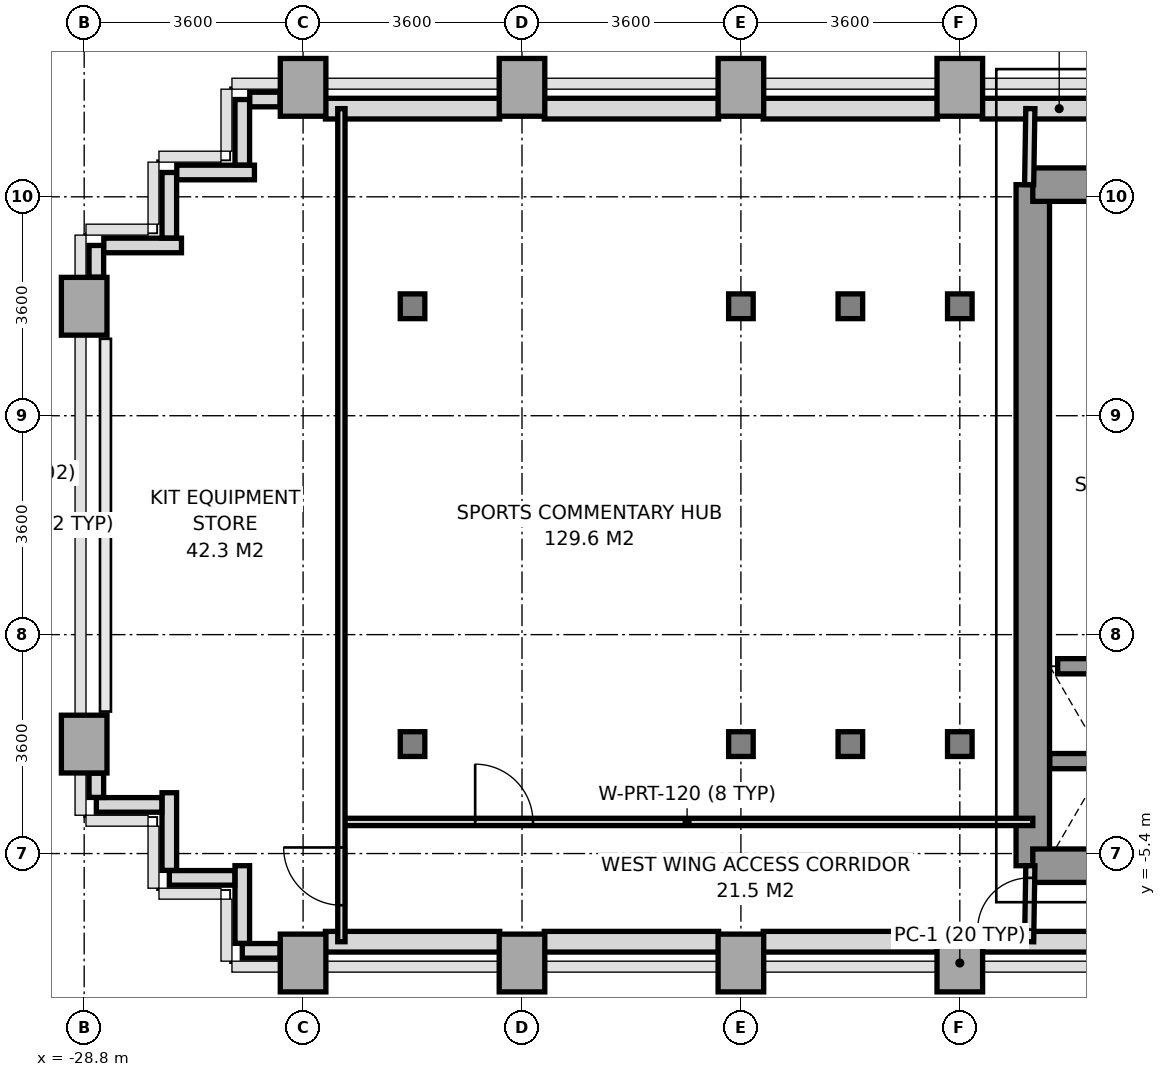
"""IFC4 building model, lengths in metres.
Left out: names, types, materials, properties, quantities, classifications, styles, units other than length and angle.
Written with IfcOpenShell. Run it as: python <this file> out.ifc"""

import sys

from ifc_helpers import new_model, si_unit, direction, frame, frame_2d, origin, origin_2d, place, context, subcontext, project, spatial, rectangle, i_section, extrude, source, transform, mapped, element, fill, save


model = new_model("IFC4")
c1 = context("Model", 3, precision=1e-05, world=origin(), true_north=direction((0.0, 1.0)))
c2 = subcontext(c1, "Body", "Model", "MODEL_VIEW")
j1 = project(units=[si_unit("LENGTHUNIT", "METRE"), si_unit("PLANEANGLEUNIT", "RADIAN")], contexts=[c1])
p1 = place(None, origin())
s1 = spatial("IfcSite", under=j1, at=p1, CompositionType="ELEMENT")
p2 = place(p1, origin())
s2 = spatial("IfcBuilding", under=s1, at=p2, CompositionType="ELEMENT")
p3 = place(p2, frame((0.0, 0.0, 74.8)))
s3 = spatial("IfcBuildingStorey", under=s2, at=p3, CompositionType="ELEMENT", Elevation=74.8)
m1 = source(origin(), c2, "Body", "SweptSolid", [
    extrude(rectangle(XDim=0.75, YDim=0.95, at=origin_2d()), origin(), (0.0, 0.0, 1.0), 3.2),
])
for number, where, z_axis, x_axis in (
    (1, (-28.8, -3.6, 0.0), (0.0, 0.0, 1.0), (1.0, 0.0, 0.0)),
    (2, (-28.8, 3.6, 0.0), (0.0, 0.0, 1.0), (1.0, 0.0, 0.0)),
    (3, (-25.2, -7.2, 0.0), (0.0, 0.0, 1.0), (1.0, 0.0, 0.0)),
    (4, (-25.2, 7.2, 0.0), (0.0, 0.0, 1.0), (1.0, 0.0, 0.0)),
):
    element("IfcColumn", number, at=place(p3, frame(where, z_axis=z_axis, x_axis=x_axis)), inside=s3, PredefinedType="COLUMN", context=c2, shape_type="MappedRepresentation", body=[
        mapped(m1, transform((0.0, 0.0, 0.0), x_axis=(1.0, 0.0, 0.0), y_axis=(0.0, 1.0, 0.0), z_axis=(0.0, 0.0, 1.0), scale=1.0)),
    ])
m2 = source(origin(), c2, "Body", "SweptSolid", [
    extrude(i_section(OverallWidth=0.404, OverallDepth=0.407, WebThickness=0.022, FlangeThickness=0.035, at=origin_2d()), origin(), (0.0, 0.0, 1.0), 3.2),
])
for number, where, z_axis, x_axis in (
    (5, (-23.4, -3.6, 0.0), (0.0, 0.0, 1.0), (1.0, 0.0, 0.0)),
    (6, (-23.4, 3.6, 0.0), (0.0, 0.0, 1.0), (1.0, 0.0, 0.0)),
):
    element("IfcColumn", number, at=place(p3, frame(where, z_axis=z_axis, x_axis=x_axis)), inside=s3, PredefinedType="COLUMN", context=c2, shape_type="MappedRepresentation", body=[
        mapped(m2, transform((0.0, 0.0, 0.0), x_axis=(1.0, 0.0, 0.0), y_axis=(0.0, 1.0, 0.0), z_axis=(0.0, 0.0, 1.0), scale=1.0)),
    ])
for number, where, z_axis, x_axis in (
    (7, (-21.6, -7.2, 0.0), (0.0, 0.0, 1.0), (1.0, 0.0, 0.0)),
    (8, (-21.6, 7.2, 0.0), (0.0, 0.0, 1.0), (1.0, 0.0, 0.0)),
    (9, (-18.0, -7.2, 0.0), (0.0, 0.0, 1.0), (1.0, 0.0, 0.0)),
):
    element("IfcColumn", number, at=place(p3, frame(where, z_axis=z_axis, x_axis=x_axis)), inside=s3, PredefinedType="COLUMN", context=c2, shape_type="MappedRepresentation", body=[
        mapped(m1, transform((0.0, 0.0, 0.0), x_axis=(1.0, 0.0, 0.0), y_axis=(0.0, 1.0, 0.0), z_axis=(0.0, 0.0, 1.0), scale=1.0)),
    ])
for number, where, z_axis, x_axis in (
    (10, (-18.0, -3.6, 0.0), (0.0, 0.0, 1.0), (1.0, 0.0, 0.0)),
    (11, (-18.0, 3.6, 0.0), (0.0, 0.0, 1.0), (1.0, 0.0, 0.0)),
):
    element("IfcColumn", number, at=place(p3, frame(where, z_axis=z_axis, x_axis=x_axis)), inside=s3, PredefinedType="COLUMN", context=c2, shape_type="MappedRepresentation", body=[
        mapped(m2, transform((0.0, 0.0, 0.0), x_axis=(1.0, 0.0, 0.0), y_axis=(0.0, 1.0, 0.0), z_axis=(0.0, 0.0, 1.0), scale=1.0)),
    ])
p4 = place(p3, frame((-18.0, 7.2, 0.0), z_axis=(0.0, 0.0, 1.0), x_axis=(1.0, 0.0, 0.0)))
e12 = element("IfcColumn", 12, at=p4, inside=s3, PredefinedType="COLUMN", context=c2, shape_type="MappedRepresentation", body=[
    mapped(m1, transform((0.0, 0.0, 0.0), x_axis=(1.0, 0.0, 0.0), y_axis=(0.0, 1.0, 0.0), z_axis=(0.0, 0.0, 1.0), scale=1.0)),
])
for number, where, z_axis, x_axis in (
    (13, (-16.2, -3.6, 0.0), (0.0, 0.0, 1.0), (1.0, 0.0, 0.0)),
    (14, (-16.2, 3.6, 0.0), (0.0, 0.0, 1.0), (1.0, 0.0, 0.0)),
):
    element("IfcColumn", number, at=place(p3, frame(where, z_axis=z_axis, x_axis=x_axis)), inside=s3, PredefinedType="COLUMN", context=c2, shape_type="MappedRepresentation", body=[
        mapped(m2, transform((0.0, 0.0, 0.0), x_axis=(1.0, 0.0, 0.0), y_axis=(0.0, 1.0, 0.0), z_axis=(0.0, 0.0, 1.0), scale=1.0)),
    ])
p5 = place(p3, frame((-14.4, -7.2, 0.0), z_axis=(0.0, 0.0, 1.0), x_axis=(1.0, 0.0, 0.0)))
e15 = element("IfcColumn", 15, at=p5, inside=s3, PredefinedType="COLUMN", context=c2, shape_type="MappedRepresentation", body=[
    mapped(m1, transform((0.0, 0.0, 0.0), x_axis=(1.0, 0.0, 0.0), y_axis=(0.0, 1.0, 0.0), z_axis=(0.0, 0.0, 1.0), scale=1.0)),
])
for number, where, z_axis, x_axis in (
    (16, (-14.4, -3.6, 0.0), (0.0, 0.0, 1.0), (1.0, 0.0, 0.0)),
    (17, (-14.4, 3.6, 0.0), (0.0, 0.0, 1.0), (1.0, 0.0, 0.0)),
):
    element("IfcColumn", number, at=place(p3, frame(where, z_axis=z_axis, x_axis=x_axis)), inside=s3, PredefinedType="COLUMN", context=c2, shape_type="MappedRepresentation", body=[
        mapped(m2, transform((0.0, 0.0, 0.0), x_axis=(1.0, 0.0, 0.0), y_axis=(0.0, 1.0, 0.0), z_axis=(0.0, 0.0, 1.0), scale=1.0)),
    ])
p6 = place(p3, frame((-14.4, 7.2, 0.0), z_axis=(0.0, 0.0, 1.0), x_axis=(1.0, 0.0, 0.0)))
e18 = element("IfcColumn", 18, at=p6, inside=s3, PredefinedType="COLUMN", context=c2, shape_type="MappedRepresentation", body=[
    mapped(m1, transform((0.0, 0.0, 0.0), x_axis=(1.0, 0.0, 0.0), y_axis=(0.0, 1.0, 0.0), z_axis=(0.0, 0.0, 1.0), scale=1.0)),
])
for number, where, z_axis, x_axis in (
    (19, (-24.833, 6.85, 0.0), (0.0, 0.0, 1.0), (1.0, 0.0, 0.0)),
    (20, (-21.233, 6.85, 0.0), (0.0, 0.0, 1.0), (1.0, 0.0, 0.0)),
    (21, (-17.633, 6.85, 0.0), (0.0, 0.0, 1.0), (1.0, 0.0, 0.0)),
):
    element("IfcWall", number, at=place(p3, frame(where, z_axis=z_axis, x_axis=x_axis)), inside=s3, PredefinedType="SOLIDWALL", context=c2, shape_type="SweptSolid", body=[
        extrude(rectangle(XDim=2.866, YDim=0.34, at=frame_2d((1.433, 0.0))), origin(), (0.0, 0.0, 1.0), 2.45),
    ])
p7 = place(p3, frame((-14.033, 6.85, 0.0), z_axis=(0.0, 0.0, 1.0), x_axis=(1.0, 0.0, 0.0)))
e22 = element("IfcWall", 22, at=p7, inside=s3, PredefinedType="SOLIDWALL", context=c2, shape_type="SweptSolid", body=[
    extrude(rectangle(XDim=2.535, YDim=0.34, at=frame_2d((1.268, 0.0))), origin(), (0.0, 0.0, 1.0), 3.2),
])
for number, where, z_axis, x_axis in (
    (23, (-24.833, -6.85, 0.0), (0.0, 0.0, 1.0), (1.0, 0.0, 0.0)),
    (24, (-21.233, -6.85, 0.0), (0.0, 0.0, 1.0), (1.0, 0.0, 0.0)),
    (25, (-17.633, -6.85, 0.0), (0.0, 0.0, 1.0), (1.0, 0.0, 0.0)),
):
    element("IfcWall", number, at=place(p3, frame(where, z_axis=z_axis, x_axis=x_axis)), inside=s3, PredefinedType="SOLIDWALL", context=c2, shape_type="SweptSolid", body=[
        extrude(rectangle(XDim=2.866, YDim=0.34, at=frame_2d((1.433, 0.0))), origin(), (0.0, 0.0, 1.0), 2.45),
    ])
p8 = place(p3, frame((-14.033, -6.85, 0.0), z_axis=(0.0, 0.0, 1.0), x_axis=(1.0, 0.0, 0.0)))
e26 = element("IfcWall", 26, at=p8, inside=s3, PredefinedType="SOLIDWALL", context=c2, shape_type="SweptSolid", body=[
    extrude(rectangle(XDim=2.283, YDim=0.34, at=frame_2d((1.142, 0.0))), origin(), (0.0, 0.0, 1.0), 3.2),
])
p9 = place(p3, frame((-25.578, -7.0, 0.0), z_axis=(0.0, 0.0, 1.0), x_axis=(-1.0, 0.0, 0.0)))
e27 = element("IfcWall", 27, at=p9, inside=s3, PredefinedType="PARAPET", context=c2, shape_type="SweptSolid", body=[
    extrude(rectangle(XDim=0.622, YDim=0.24, at=frame_2d((0.311, 0.0))), origin(), (0.0, 0.0, 1.0), 1.15),
])
p10 = place(p3, frame((-26.2, -6.877, 0.0), z_axis=(0.0, 0.0, 1.0), x_axis=(0.0, 1.0, 0.0)))
e28 = element("IfcWall", 28, at=p10, inside=s3, PredefinedType="PARAPET", context=c2, shape_type="SweptSolid", body=[
    extrude(rectangle(XDim=1.277, YDim=0.24, at=frame_2d((0.638, 0.0))), origin(), (0.0, 0.0, 1.0), 1.15),
])
p11 = place(p3, frame((-26.323, -5.8, 0.0), z_axis=(0.0, 0.0, 1.0), x_axis=(-1.0, 0.0, 0.0)))
e29 = element("IfcWall", 29, at=p11, inside=s3, PredefinedType="PARAPET", context=c2, shape_type="SweptSolid", body=[
    extrude(rectangle(XDim=1.077, YDim=0.24, at=frame_2d((0.539, 0.0))), origin(), (0.0, 0.0, 1.0), 1.15),
])
p12 = place(p3, frame((-27.4, -5.677, 0.0), z_axis=(0.0, 0.0, 1.0), x_axis=(0.0, 1.0, 0.0)))
e30 = element("IfcWall", 30, at=p12, inside=s3, PredefinedType="PARAPET", context=c2, shape_type="SweptSolid", body=[
    extrude(rectangle(XDim=1.277, YDim=0.24, at=frame_2d((0.639, 0.0))), origin(), (0.0, 0.0, 1.0), 1.15),
])
p13 = place(p3, frame((-27.523, -4.6, 0.0), z_axis=(0.0, 0.0, 1.0), x_axis=(-1.0, 0.0, 0.0)))
e31 = element("IfcWall", 31, at=p13, inside=s3, PredefinedType="PARAPET", context=c2, shape_type="SweptSolid", body=[
    extrude(rectangle(XDim=1.077, YDim=0.24, at=frame_2d((0.539, 0.0))), origin(), (0.0, 0.0, 1.0), 1.15),
])
p14 = place(p3, frame((-28.6, -4.477, 0.0), z_axis=(0.0, 0.0, 1.0), x_axis=(0.0, 1.0, 0.0)))
e32 = element("IfcWall", 32, at=p14, inside=s3, PredefinedType="PARAPET", context=c2, shape_type="SweptSolid", body=[
    extrude(rectangle(XDim=0.399, YDim=0.24, at=frame_2d((0.2, 0.0))), origin(), (0.0, 0.0, 1.0), 1.15),
])
p15 = place(p3, frame((-28.6, 4.078, 0.0), z_axis=(0.0, 0.0, 1.0), x_axis=(0.0, 1.0, 0.0)))
e33 = element("IfcWall", 33, at=p15, inside=s3, PredefinedType="PARAPET", context=c2, shape_type="SweptSolid", body=[
    extrude(rectangle(XDim=0.522, YDim=0.24, at=frame_2d((0.261, 0.0))), origin(), (0.0, 0.0, 1.0), 1.15),
])
p16 = place(p3, frame((-28.477, 4.6, 0.0), z_axis=(0.0, 0.0, 1.0), x_axis=(1.0, 0.0, 0.0)))
e34 = element("IfcWall", 34, at=p16, inside=s3, PredefinedType="PARAPET", context=c2, shape_type="SweptSolid", body=[
    extrude(rectangle(XDim=1.277, YDim=0.24, at=frame_2d((0.639, 0.0))), origin(), (0.0, 0.0, 1.0), 1.15),
])
p17 = place(p3, frame((-27.4, 4.723, 0.0), z_axis=(0.0, 0.0, 1.0), x_axis=(0.0, 1.0, 0.0)))
e35 = element("IfcWall", 35, at=p17, inside=s3, PredefinedType="PARAPET", context=c2, shape_type="SweptSolid", body=[
    extrude(rectangle(XDim=1.077, YDim=0.24, at=frame_2d((0.539, 0.0))), origin(), (0.0, 0.0, 1.0), 1.15),
])
p18 = place(p3, frame((-27.277, 5.8, 0.0), z_axis=(0.0, 0.0, 1.0), x_axis=(1.0, 0.0, 0.0)))
e36 = element("IfcWall", 36, at=p18, inside=s3, PredefinedType="PARAPET", context=c2, shape_type="SweptSolid", body=[
    extrude(rectangle(XDim=1.277, YDim=0.24, at=frame_2d((0.639, 0.0))), origin(), (0.0, 0.0, 1.0), 1.15),
])
p19 = place(p3, frame((-26.2, 5.923, 0.0), z_axis=(0.0, 0.0, 1.0), x_axis=(0.0, 1.0, 0.0)))
e37 = element("IfcWall", 37, at=p19, inside=s3, PredefinedType="PARAPET", context=c2, shape_type="SweptSolid", body=[
    extrude(rectangle(XDim=1.077, YDim=0.24, at=frame_2d((0.539, 0.0))), origin(), (0.0, 0.0, 1.0), 1.15),
])
p20 = place(p3, frame((-26.077, 7.0, 0.0), z_axis=(0.0, 0.0, 1.0), x_axis=(1.0, 0.0, 0.0)))
e38 = element("IfcWall", 38, at=p20, inside=s3, PredefinedType="PARAPET", context=c2, shape_type="SweptSolid", body=[
    extrude(rectangle(XDim=0.499, YDim=0.24, at=frame_2d((0.25, 0.0))), origin(), (0.0, 0.0, 1.0), 1.15),
])
p21 = place(p3, frame((-13.2, -5.6, 0.0), z_axis=(0.0, 0.0, 1.0), x_axis=(0.0, 1.0, 0.0)))
e39 = element("IfcWall", 39, at=p21, inside=s3, PredefinedType="SHEAR", context=c2, shape_type="SweptSolid", body=[
    extrude(rectangle(XDim=11.2, YDim=0.55, at=frame_2d((5.6, 0.0))), origin(), (0.0, 0.0, 1.0), 3.2),
])
p22 = place(p3, frame((-13.2, 5.6, 0.0), z_axis=(0.0, 0.0, 1.0), x_axis=(1.0, 0.0, 0.0)))
e40 = element("IfcWall", 40, at=p22, inside=s3, PredefinedType="SHEAR", context=c2, shape_type="SweptSolid", body=[
    extrude(rectangle(XDim=1.819, YDim=0.55, at=frame_2d((0.909, 0.0))), origin(), (0.0, 0.0, 1.0), 3.2),
])
p23 = place(p3, frame((-13.2, -5.6, 0.0), z_axis=(0.0, 0.0, 1.0), x_axis=(1.0, 0.0, 0.0)))
e41 = element("IfcWall", 41, at=p23, inside=s3, PredefinedType="SHEAR", context=c2, shape_type="SweptSolid", body=[
    extrude(rectangle(XDim=7.8, YDim=0.55, at=frame_2d((3.9, 0.0))), origin(), (0.0, 0.0, 1.0), 3.2),
])
p24 = place(p23, frame((3.6, 0.0, 0.0)))
e42 = element("IfcOpeningElement", 42, at=p24, cuts=e41, PredefinedType="OPENING", context=c2, shape_type="SweptSolid", body=[
    extrude(rectangle(XDim=1.2, YDim=2.2, at=frame_2d((0.6, 1.1))), frame((0.0, 0.285, 0.0), z_axis=(0.0, -1.0, 0.0), x_axis=(1.0, 0.0, 0.0)), (0.0, 0.0, 1.0), 0.57),
])
p25 = place(p3, frame((-12.92, -3.88, 0.0), z_axis=(0.0, 0.0, 1.0), x_axis=(1.0, 0.0, 0.0)))
e43 = element("IfcWall", 43, at=p25, inside=s3, PredefinedType="SOLIDWALL", context=c2, shape_type="SweptSolid", body=[
    extrude(rectangle(XDim=1.84, YDim=0.25, at=frame_2d((0.92, 0.0))), origin(), (0.0, 0.0, 1.0), 3.2),
])
p26 = place(p3, frame((-12.791, -2.32, 0.0), z_axis=(0.0, 0.0, 1.0), x_axis=(1.0, 0.0, 0.0)))
e44 = element("IfcWall", 44, at=p26, inside=s3, PredefinedType="SOLIDWALL", context=c2, shape_type="SweptSolid", body=[
    extrude(rectangle(XDim=1.582, YDim=0.25, at=frame_2d((0.791, 0.0))), origin(), (0.0, 0.0, 1.0), 3.2),
])
p27 = place(p3, frame((-13.26, 5.6, 0.0), z_axis=(0.0, 0.0, 1.0), x_axis=(0.016013571389, 0.999871774545, 0.0)))
e45 = element("IfcWall", 45, at=p27, inside=s3, PredefinedType="PARTITIONING", context=c2, shape_type="SweptSolid", body=[
    extrude(rectangle(XDim=1.25, YDim=0.15, at=frame_2d((0.625, 0.0))), origin(), (0.0, 0.0, 1.0), 3.2),
])
p28 = place(p3, frame((-13.26, -6.85, 0.0), z_axis=(0.0, 0.0, 1.0), x_axis=(0.016013571389, 0.999871774545, 0.0)))
e46 = element("IfcWall", 46, at=p28, inside=s3, PredefinedType="PARTITIONING", context=c2, shape_type="SweptSolid", body=[
    extrude(rectangle(XDim=1.25, YDim=0.15, at=frame_2d((0.625, 0.0))), origin(), (0.0, 0.0, 1.0), 3.2),
])
p29 = place(p28, frame((0.2, 0.0, 0.0)))
e47 = element("IfcOpeningElement", 47, at=p29, cuts=e46, PredefinedType="OPENING", context=c2, shape_type="SweptSolid", body=[
    extrude(rectangle(XDim=0.85, YDim=2.1, at=frame_2d((0.425, 1.05))), frame((0.0, 0.085, 0.0), z_axis=(0.0, -1.0, 0.0), x_axis=(1.0, 0.0, 0.0)), (0.0, 0.0, 1.0), 0.17),
])
p30 = place(p3, frame((-24.57, -4.88, 0.0), z_axis=(0.0, 0.0, 1.0), x_axis=(1.0, 0.0, 0.0)))
e48 = element("IfcWall", 48, at=p30, inside=s3, PredefinedType="PARTITIONING", context=c2, shape_type="SweptSolid", body=[
    extrude(rectangle(XDim=11.37, YDim=0.12, at=frame_2d((5.685, 0.0))), origin(), (0.0, 0.0, 1.0), 2.7),
])
p31 = place(p30, frame((2.2, 0.0, 0.0)))
e49 = element("IfcOpeningElement", 49, at=p31, cuts=e48, PredefinedType="OPENING", context=c2, shape_type="SweptSolid", body=[
    extrude(rectangle(XDim=0.95, YDim=2.15, at=frame_2d((0.475, 1.075))), frame((0.0, 0.07, 0.0), z_axis=(0.0, -1.0, 0.0), x_axis=(1.0, 0.0, 0.0)), (0.0, 0.0, 1.0), 0.14),
])
p32 = place(p3, frame((-24.57, -6.85, 0.0), z_axis=(0.0, 0.0, 1.0), x_axis=(0.0, 1.0, 0.0)))
e50 = element("IfcWall", 50, at=p32, inside=s3, PredefinedType="PARTITIONING", context=c2, shape_type="SweptSolid", body=[
    extrude(rectangle(XDim=13.7, YDim=0.12, at=frame_2d((6.85, 0.0))), origin(), (0.0, 0.0, 1.0), 2.71),
])
p33 = place(p32, frame((0.6, 0.0, 0.0)))
e51 = element("IfcOpeningElement", 51, at=p33, cuts=e50, PredefinedType="OPENING", context=c2, shape_type="SweptSolid", body=[
    extrude(rectangle(XDim=0.95, YDim=2.15, at=frame_2d((0.475, 1.075))), frame((0.0, 0.07, 0.0), z_axis=(0.0, -1.0, 0.0), x_axis=(1.0, 0.0, 0.0)), (0.0, 0.0, 1.0), 0.14),
])
m3 = source(origin(), c2, "Body", "SweptSolid", [
    extrude(rectangle(XDim=0.95, YDim=2.15, at=frame_2d((0.475, 1.075))), frame((0.0, 0.025, 0.0), z_axis=(0.0, -1.0, 0.0), x_axis=(1.0, 0.0, 0.0)), (0.0, 0.0, 1.0), 0.05),
])
p34 = place(p31, origin())
e52 = element("IfcDoor", 52, at=p34, inside=s3, OperationType="SINGLE_SWING_LEFT", PredefinedType="DOOR", context=c2, shape_type="MappedRepresentation", body=[
    mapped(m3, transform((0.0, 0.0, 0.0), x_axis=(1.0, 0.0, 0.0), y_axis=(0.0, 1.0, 0.0), z_axis=(0.0, 0.0, 1.0), scale=1.0)),
])
fill(e49, e52)
p35 = place(p33, origin())
e53 = element("IfcDoor", 53, at=p35, inside=s3, OperationType="SINGLE_SWING_RIGHT", PredefinedType="DOOR", context=c2, shape_type="MappedRepresentation", body=[
    mapped(m3, transform((0.0, 0.0, 0.0), x_axis=(1.0, 0.0, 0.0), y_axis=(0.0, 1.0, 0.0), z_axis=(0.0, 0.0, 1.0), scale=1.0)),
])
fill(e51, e53)
m4 = source(origin(), c2, "Body", "SweptSolid", [
    extrude(rectangle(XDim=0.85, YDim=2.1, at=frame_2d((0.425, 1.05))), frame((0.0, 0.025, 0.0), z_axis=(0.0, -1.0, 0.0), x_axis=(1.0, 0.0, 0.0)), (0.0, 0.0, 1.0), 0.05),
])
p36 = place(p29, origin())
e54 = element("IfcDoor", 54, at=p36, inside=s3, OperationType="SINGLE_SWING_LEFT", PredefinedType="DOOR", context=c2, shape_type="MappedRepresentation", body=[
    mapped(m4, transform((0.0, 0.0, 0.0), x_axis=(1.0, 0.0, 0.0), y_axis=(0.0, 1.0, 0.0), z_axis=(0.0, 0.0, 1.0), scale=1.0)),
])
fill(e47, e54)
save(model, sys.argv[1])
